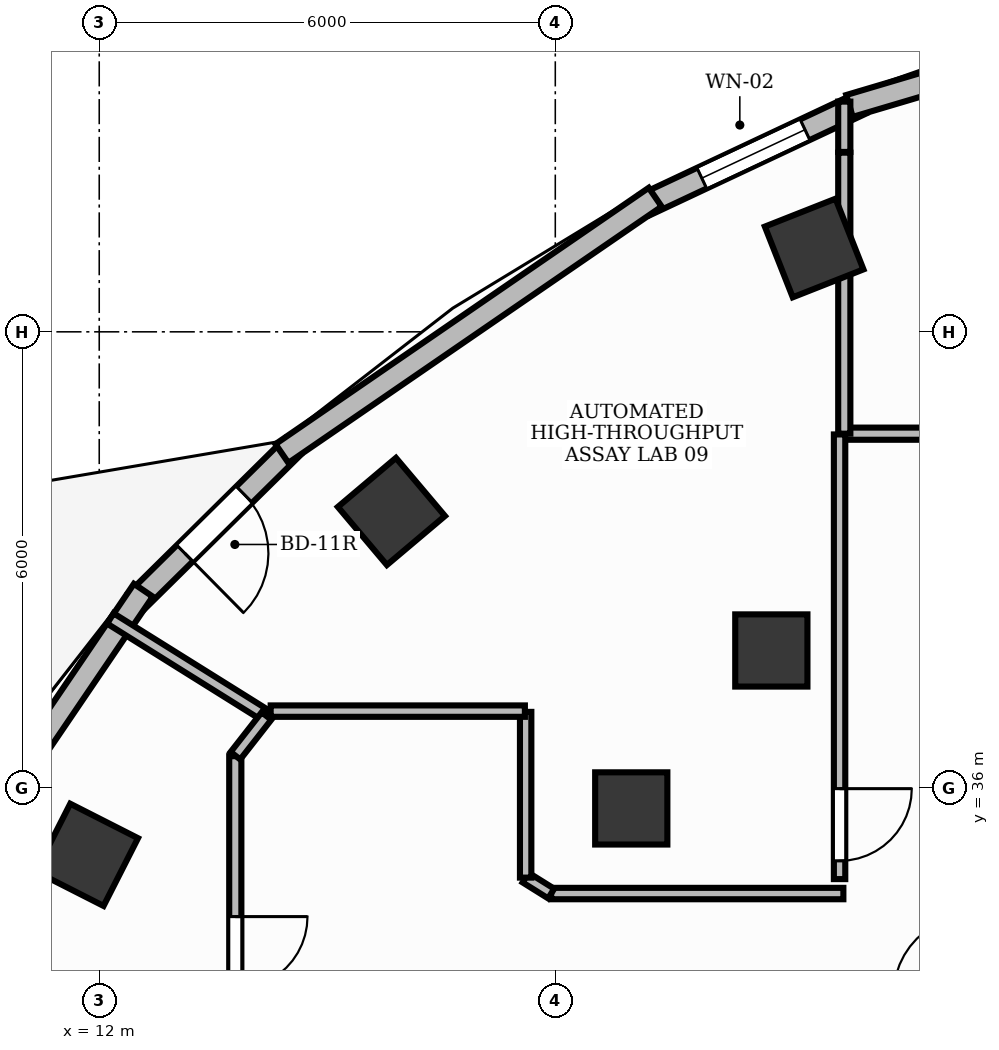
"""IFC4 building model, lengths in metres.
Left out: names, types, materials, properties, quantities, classifications, styles, units other than length and angle.
Written with IfcOpenShell. Run it as: python <this file> out.ifc"""

import sys

from ifc_helpers import new_model, si_unit, direction, frame, frame_2d, origin, origin_2d, place, context, subcontext, project, spatial, rectangle, extrude, element, fill, save


model = new_model("IFC4")
c1 = context("Model", 3, precision=1e-05, world=origin(), true_north=direction((0.0, 1.0)))
c2 = subcontext(c1, "Body", "Model", "MODEL_VIEW")
j1 = project(units=[si_unit("LENGTHUNIT", "METRE"), si_unit("PLANEANGLEUNIT", "RADIAN")], contexts=[c1])
p1 = place(None, origin())
s1 = spatial("IfcSite", under=j1, at=p1, CompositionType="ELEMENT")
p2 = place(p1, origin())
s2 = spatial("IfcBuilding", under=s1, at=p2, CompositionType="ELEMENT")
p3 = place(p2, frame((0.0, 0.0, 183.6)))
s3 = spatial("IfcBuildingStorey", under=s2, at=p3, CompositionType="ELEMENT", Elevation=183.6)
for number, where, z_axis, x_axis in (
    (1, (21.406, 43.103, -0.0), (0.0, 0.0, 1.0), (0.93, 0.367, 0.0)),
    (2, (15.844, 39.637, -0.0), (0.0, 0.0, 1.0), (0.764, 0.645, 0.0)),
):
    element("IfcColumn", number, at=place(p3, frame(where, z_axis=z_axis, x_axis=x_axis)), inside=s3, PredefinedType="COLUMN", context=c2, shape_type="SweptSolid", body=[
        extrude(rectangle(XDim=1.0, YDim=1.0, at=origin_2d()), origin(), (0.0, 0.0, 1.0), 3.901),
    ])
p4 = place(p3, frame((20.842, 37.808, -0.0), z_axis=(0.0, 0.0, 1.0), x_axis=(1.0, 0.0, 0.0)))
e3 = element("IfcColumn", 3, at=p4, inside=s3, PredefinedType="COLUMN", context=c2, shape_type="SweptSolid", body=[
    extrude(rectangle(XDim=0.95, YDim=0.95, at=origin_2d()), origin(), (0.0, 0.0, 1.0), 3.901),
])
p5 = place(p3, frame((11.838, 35.119, -0.0), z_axis=(0.0, 0.0, 1.0), x_axis=(0.453057191132, 0.891481453292, 0.0)))
e4 = element("IfcColumn", 4, at=p5, inside=s3, PredefinedType="COLUMN", context=c2, shape_type="SweptSolid", body=[
    extrude(rectangle(XDim=1.0, YDim=1.0, at=origin_2d()), origin(), (0.0, 0.0, 1.0), 3.901),
])
p6 = place(p3, frame((19.0, 35.73, -0.0), z_axis=(0.0, 0.0, 1.0), x_axis=(1.0, 0.0, 0.0)))
e5 = element("IfcColumn", 5, at=p6, inside=s3, PredefinedType="COLUMN", context=c2, shape_type="SweptSolid", body=[
    extrude(rectangle(XDim=0.95, YDim=0.95, at=origin_2d()), origin(), (0.0, 0.0, 1.0), 3.901),
])
p7 = place(p3, frame((22.03, 45.01, 0.0), z_axis=(0.0, 0.0, 1.0), x_axis=(-0.905013842092, -0.425382117186, 0.0)))
e6 = element("IfcWall", 6, at=p7, inside=s3, PredefinedType="STANDARD", context=c2, shape_type="SweptSolid", body=[
    extrude(rectangle(XDim=3.146, YDim=0.3, at=frame_2d((1.573, 0.0))), origin(), (0.0, 0.0, 1.0), 3.9),
])
p8 = place(p7, frame((0.823, 0.0, 0.95)))
e7 = element("IfcOpeningElement", 7, at=p8, cuts=e6, PredefinedType="OPENING", context=c2, shape_type="SweptSolid", body=[
    extrude(rectangle(XDim=1.5, YDim=1.8, at=frame_2d((0.75, 0.9))), frame((0.0, 0.165, 0.0), z_axis=(0.0, -1.0, 0.0), x_axis=(1.0, 0.0, 0.0)), (0.0, 0.0, 1.0), 0.33),
])
p9 = place(p3, frame((14.546, 40.489, 0.0), z_axis=(0.0, 0.0, 1.0), x_axis=(-0.711442799636, -0.70274400947, 0.0)))
e8 = element("IfcWall", 8, at=p9, inside=s3, PredefinedType="STANDARD", context=c2, shape_type="SweptSolid", body=[
    extrude(rectangle(XDim=2.891, YDim=0.3, at=frame_2d((1.445, 0.0))), origin(), (0.0, 0.0, 1.0), 3.9),
])
p10 = place(p9, frame((0.896, 0.0, 0.0)))
e9 = element("IfcOpeningElement", 9, at=p10, cuts=e8, PredefinedType="OPENING", context=c2, shape_type="SweptSolid", body=[
    extrude(rectangle(XDim=1.1, YDim=2.15, at=frame_2d((0.55, 1.075))), frame((0.0, 0.165, 0.0), z_axis=(0.0, -1.0, 0.0), x_axis=(1.0, 0.0, 0.0)), (0.0, 0.0, 1.0), 0.33),
])
p11 = place(p3, frame((28.002, 46.791, 0.0), z_axis=(0.0, 0.0, 1.0), x_axis=(-0.958672086524, -0.284513322218, 0.0)))
e10 = element("IfcWall", 10, at=p11, inside=s3, PredefinedType="STANDARD", context=c2, shape_type="SweptSolid", body=[
    extrude(rectangle(XDim=6.396, YDim=0.3, at=frame_2d((3.198, 0.0))), origin(), (0.0, 0.0, 1.0), 3.47),
])
p12 = place(p3, frame((19.314, 43.771, 0.0), z_axis=(0.0, 0.0, 1.0), x_axis=(-0.824341970472, -0.566092144194, 0.0)))
e11 = element("IfcWall", 11, at=p12, inside=s3, PredefinedType="STANDARD", context=c2, shape_type="SweptSolid", body=[
    extrude(rectangle(XDim=5.957, YDim=0.3, at=frame_2d((2.979, 0.0))), origin(), (0.0, 0.0, 1.0), 3.9),
])
p13 = place(p3, frame((12.58, 38.601, 0.0), z_axis=(0.0, 0.0, 1.0), x_axis=(-0.561663900064, -0.827365495634, 0.0)))
e12 = element("IfcWall", 12, at=p13, inside=s3, PredefinedType="STANDARD", context=c2, shape_type="SweptSolid", body=[
    extrude(rectangle(XDim=5.438, YDim=0.3, at=frame_2d((2.719, 0.0))), origin(), (0.0, 0.0, 1.0), 3.47),
])
p14 = place(p3, frame((13.79, 36.417, 0.0), z_axis=(0.0, 0.0, 1.0), x_axis=(0.0, -1.0, 0.0)))
e13 = element("IfcWall", 13, at=p14, inside=s3, PredefinedType="PARTITIONING", context=c2, shape_type="SweptSolid", body=[
    extrude(rectangle(XDim=4.208, YDim=0.16, at=frame_2d((2.104, 0.0))), origin(), (0.0, 0.0, 1.0), 2.91),
])
p15 = place(p14, frame((2.111, 0.0, 0.0)))
e14 = element("IfcOpeningElement", 14, at=p15, cuts=e13, PredefinedType="OPENING", context=c2, shape_type="SweptSolid", body=[
    extrude(rectangle(XDim=0.95, YDim=2.15, at=frame_2d((0.475, 1.075))), frame((0.0, 0.095, 0.0), z_axis=(0.0, -1.0, 0.0), x_axis=(1.0, 0.0, 0.0)), (0.0, 0.0, 1.0), 0.19),
])
p16 = place(p3, frame((30.232, 40.66, 0.0), z_axis=(0.0, 0.0, 1.0), x_axis=(-1.0, 0.0, 0.0)))
e15 = element("IfcWall", 15, at=p16, inside=s3, PredefinedType="PARTITIONING", context=c2, shape_type="SweptSolid", body=[
    extrude(rectangle(XDim=8.43, YDim=0.16, at=frame_2d((4.215, 0.0))), origin(), (0.0, 0.0, 1.0), 2.91),
])
p17 = place(p16, frame((0.24, 0.0, 0.0)))
e16 = element("IfcOpeningElement", 16, at=p17, cuts=e15, PredefinedType="OPENING", context=c2, shape_type="SweptSolid", body=[
    extrude(rectangle(XDim=0.95, YDim=2.15, at=frame_2d((0.475, 1.075))), frame((0.0, 0.095, 0.0), z_axis=(0.0, -1.0, 0.0), x_axis=(1.0, 0.0, 0.0)), (0.0, 0.0, 1.0), 0.19),
])
p18 = place(p3, frame((21.74, 40.65, 0.0), z_axis=(0.0, 0.0, 1.0), x_axis=(0.0, -1.0, 0.0)))
e17 = element("IfcWall", 17, at=p18, inside=s3, PredefinedType="PARTITIONING", context=c2, shape_type="SweptSolid", body=[
    extrude(rectangle(XDim=5.85, YDim=0.15, at=frame_2d((2.925, 0.0))), origin(), (0.0, 0.0, 1.0), 2.91),
])
p19 = place(p18, frame((4.66, 0.0, 0.0)))
e18 = element("IfcOpeningElement", 18, at=p19, cuts=e17, PredefinedType="OPENING", context=c2, shape_type="SweptSolid", body=[
    extrude(rectangle(XDim=0.95, YDim=2.15, at=frame_2d((0.475, 1.075))), frame((0.0, 0.09, 0.0), z_axis=(0.0, -1.0, 0.0), x_axis=(1.0, 0.0, 0.0)), (0.0, 0.0, 1.0), 0.18),
])
p20 = place(p3, frame((12.146, 38.229, 0.0), z_axis=(0.0, 0.0, 1.0), x_axis=(0.848066263041, -0.529890190031, 0.0)))
e19 = element("IfcWall", 19, at=p20, inside=s3, PredefinedType="PARTITIONING", context=c2, shape_type="SweptSolid", body=[
    extrude(rectangle(XDim=2.422, YDim=0.16, at=frame_2d((1.211, 0.0))), origin(), (0.0, 0.0, 1.0), 2.91),
])
p21 = place(p3, frame((14.2, 36.946, 0.0), z_axis=(0.0, 0.0, 1.0), x_axis=(-0.615851305214, -0.787862405415, 0.0)))
e20 = element("IfcWall", 20, at=p21, inside=s3, PredefinedType="PARTITIONING", context=c2, shape_type="SweptSolid", body=[
    extrude(rectangle(XDim=0.663, YDim=0.16, at=frame_2d((0.332, 0.0))), origin(), (0.0, 0.0, 1.0), 2.91),
])
p22 = place(p3, frame((21.802, 44.367, 0.0), z_axis=(0.0, 0.0, 1.0), x_axis=(0.0, 1.0, 0.0)))
e21 = element("IfcWall", 21, at=p22, inside=s3, PredefinedType="PARTITIONING", context=c2, shape_type="SweptSolid", body=[
    extrude(rectangle(XDim=0.662, YDim=0.16, at=frame_2d((0.331, 0.0))), origin(), (0.0, 0.0, 1.0), 2.91),
])
p23 = place(p3, frame((21.802, 40.66, 0.0), z_axis=(0.0, 0.0, 1.0), x_axis=(0.0, 1.0, 0.0)))
e22 = element("IfcWall", 22, at=p23, inside=s3, PredefinedType="PARTITIONING", context=c2, shape_type="SweptSolid", body=[
    extrude(rectangle(XDim=3.697, YDim=0.16, at=frame_2d((1.849, 0.0))), origin(), (0.0, 0.0, 1.0), 2.91),
])
p24 = place(p3, frame((21.79, 34.61, 0.0), z_axis=(0.0, 0.0, 1.0), x_axis=(-1.0, 0.0, 0.0)))
e23 = element("IfcWall", 23, at=p24, inside=s3, PredefinedType="PARTITIONING", context=c2, shape_type="SweptSolid", body=[
    extrude(rectangle(XDim=3.844, YDim=0.15, at=frame_2d((1.922, 0.0))), origin(), (0.0, 0.0, 1.0), 2.91),
])
p25 = place(p3, frame((17.946, 34.61, 0.0), z_axis=(0.0, 0.0, 1.0), x_axis=(-0.84820632616, 0.529665959131, 0.0)))
e24 = element("IfcWall", 24, at=p25, inside=s3, PredefinedType="PARTITIONING", context=c2, shape_type="SweptSolid", body=[
    extrude(rectangle(XDim=0.396, YDim=0.15, at=frame_2d((0.198, 0.0))), origin(), (0.0, 0.0, 1.0), 2.91),
])
p26 = place(p3, frame((17.61, 34.82, 0.0), z_axis=(0.0, 0.0, 1.0), x_axis=(0.0, 1.0, 0.0)))
e25 = element("IfcWall", 25, at=p26, inside=s3, PredefinedType="PARTITIONING", context=c2, shape_type="SweptSolid", body=[
    extrude(rectangle(XDim=2.18, YDim=0.15, at=frame_2d((1.09, 0.0))), origin(), (0.0, 0.0, 1.0), 2.91),
])
p27 = place(p3, frame((17.6, 37.01, 0.0), z_axis=(0.0, 0.0, 1.0), x_axis=(-1.0, 0.0, 0.0)))
e26 = element("IfcWall", 26, at=p27, inside=s3, PredefinedType="PARTITIONING", context=c2, shape_type="SweptSolid", body=[
    extrude(rectangle(XDim=3.345, YDim=0.15, at=frame_2d((1.672, 0.0))), origin(), (0.0, 0.0, 1.0), 2.91),
])
p28 = place(p8, origin())
e27 = element("IfcWindow", 27, at=p28, inside=s3, PartitioningType="DOUBLE_PANEL_VERTICAL", PredefinedType="WINDOW", context=c2, shape_type="SweptSolid", body=[
    extrude(rectangle(XDim=1.5, YDim=1.8, at=frame_2d((0.75, 0.9))), frame((0.0, 0.03, 0.0), z_axis=(0.0, -1.0, 0.0), x_axis=(1.0, 0.0, 0.0)), (0.0, 0.0, 1.0), 0.06),
])
fill(e7, e27)
p29 = place(p10, origin())
e28 = element("IfcDoor", 28, at=p29, inside=s3, OperationType="SINGLE_SWING_RIGHT", PredefinedType="DOOR", context=c2, shape_type="SweptSolid", body=[
    extrude(rectangle(XDim=1.1, YDim=2.15, at=frame_2d((0.55, 1.075))), frame((0.0, 0.025, 0.0), z_axis=(0.0, -1.0, 0.0), x_axis=(1.0, 0.0, 0.0)), (0.0, 0.0, 1.0), 0.05),
])
fill(e9, e28)
p30 = place(p15, origin())
e29 = element("IfcDoor", 29, at=p30, inside=s3, OperationType="SINGLE_SWING_LEFT", PredefinedType="DOOR", context=c2, shape_type="SweptSolid", body=[
    extrude(rectangle(XDim=0.95, YDim=2.15, at=frame_2d((0.475, 1.075))), frame((0.0, 0.025, 0.0), z_axis=(0.0, -1.0, 0.0), x_axis=(1.0, 0.0, 0.0)), (0.0, 0.0, 1.0), 0.05),
])
fill(e14, e29)
p31 = place(p19, origin())
e30 = element("IfcDoor", 30, at=p31, inside=s3, OperationType="SINGLE_SWING_LEFT", PredefinedType="DOOR", context=c2, shape_type="SweptSolid", body=[
    extrude(rectangle(XDim=0.95, YDim=2.15, at=frame_2d((0.475, 1.075))), frame((0.0, 0.025, 0.0), z_axis=(0.0, -1.0, 0.0), x_axis=(1.0, 0.0, 0.0)), (0.0, 0.0, 1.0), 0.05),
])
fill(e18, e30)
save(model, sys.argv[1])
